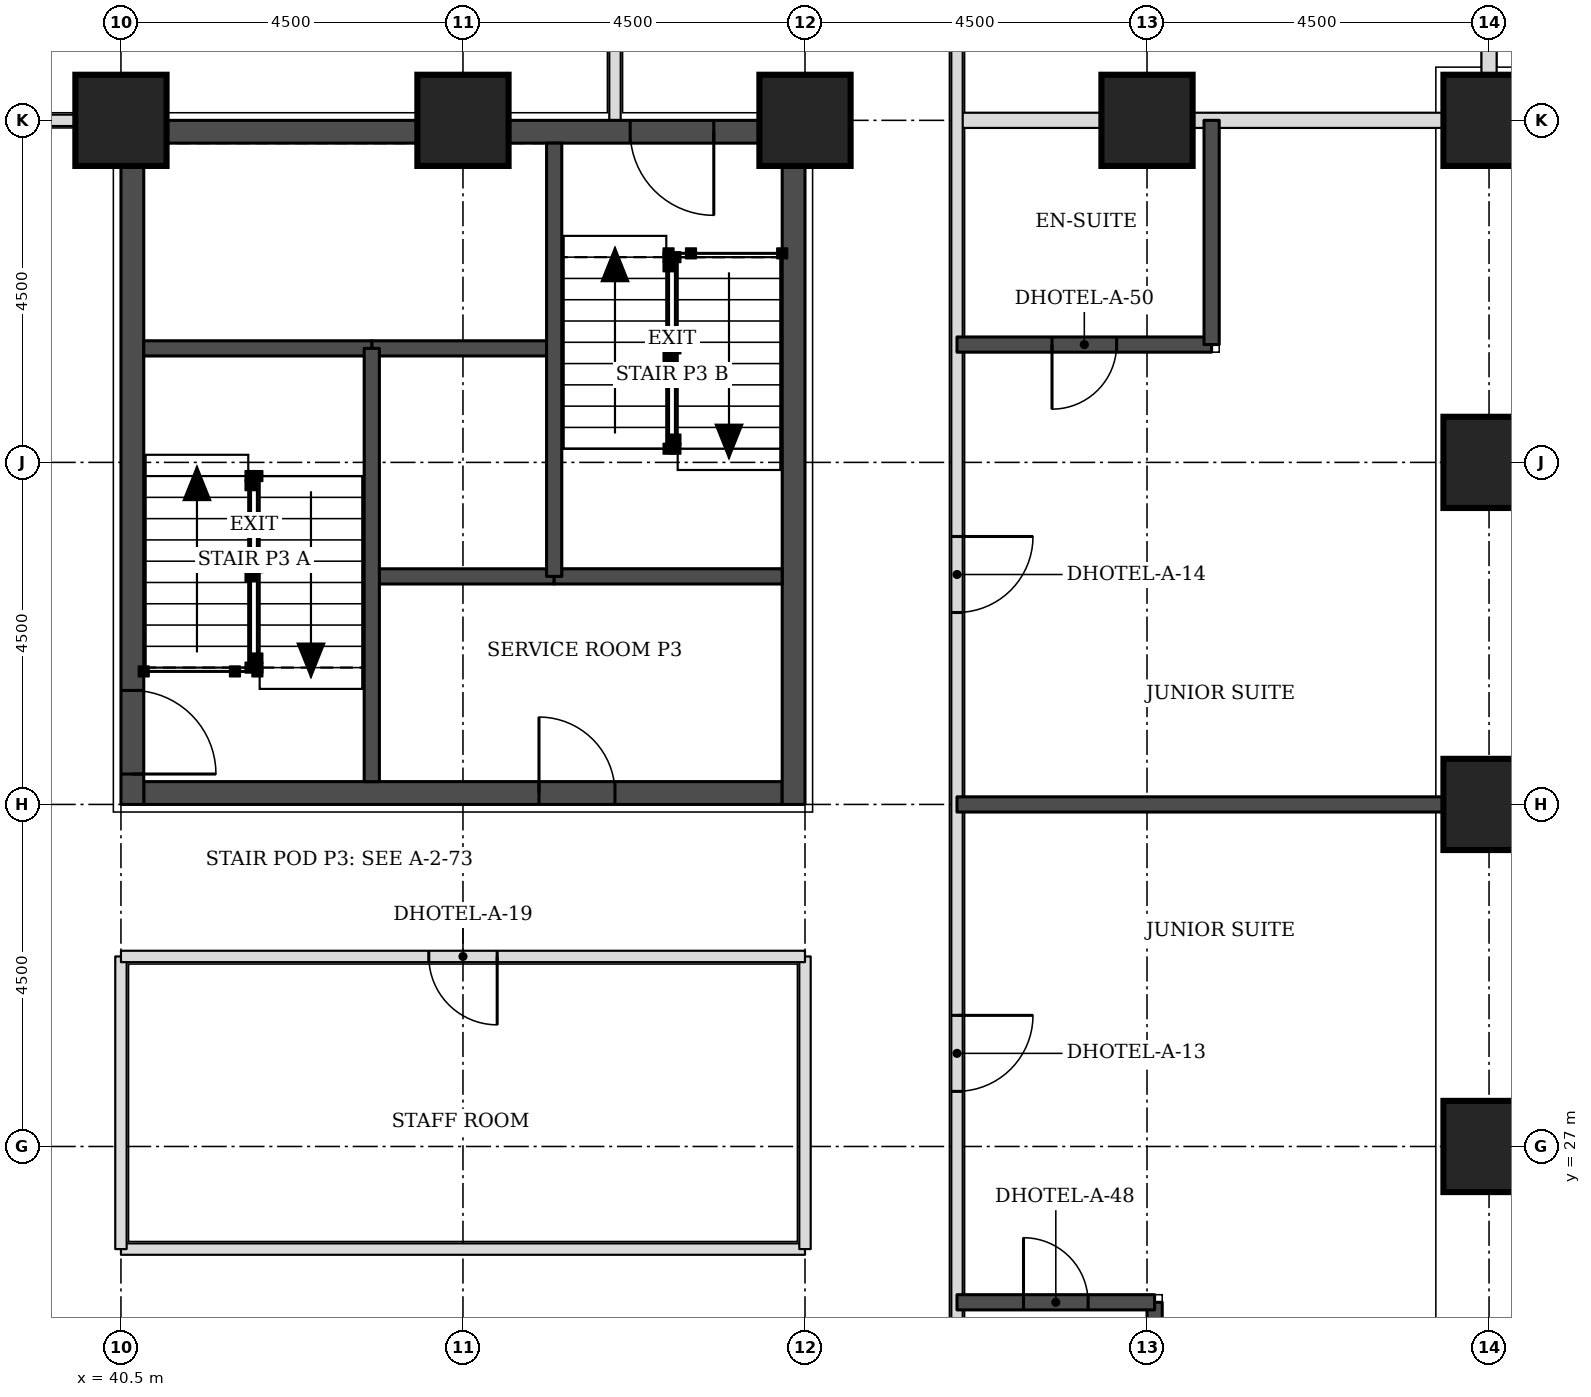
"""IFC4 building model, lengths in metres.
Left out: names, types, materials, properties, quantities, classifications, styles, units other than length and angle.
Written with IfcOpenShell. Run it as: python <this file> out.ifc"""

import sys

from ifc_helpers import new_model, si_unit, direction, frame, frame_2d, origin, origin_2d, place, context, subcontext, project, spatial, rectangle, extrude, element, fill, save


model = new_model("IFC4")
c1 = context("Model", 3, precision=1e-05, world=origin(), true_north=direction((0.0, 1.0)))
c2 = subcontext(c1, "Body", "Model", "MODEL_VIEW")
j1 = project(units=[si_unit("LENGTHUNIT", "METRE"), si_unit("PLANEANGLEUNIT", "RADIAN")], contexts=[c1])
p1 = place(None, origin())
s1 = spatial("IfcSite", under=j1, at=p1, CompositionType="ELEMENT")
p2 = place(p1, origin())
s2 = spatial("IfcBuilding", under=s1, at=p2, CompositionType="ELEMENT")
p3 = place(p2, frame((0.0, 0.0, 26.4)))
s3 = spatial("IfcBuildingStorey", under=s2, at=p3, CompositionType="ELEMENT", Elevation=26.4)
for number, where, z_axis, x_axis in (
    (1, (58.5, 27.0, 0.0), (0.0, 0.0, 1.0), (1.0, 0.0, 0.0)),
    (2, (58.5, 31.5, 0.0), (0.0, 0.0, 1.0), (1.0, 0.0, 0.0)),
    (3, (58.5, 36.0, 0.0), (0.0, 0.0, 1.0), (1.0, 0.0, 0.0)),
    (4, (40.5, 40.5, 0.0), (0.0, 0.0, 1.0), (1.0, 0.0, 0.0)),
    (5, (45.0, 40.5, 0.0), (0.0, 0.0, 1.0), (1.0, 0.0, 0.0)),
    (6, (49.5, 40.5, 0.0), (0.0, 0.0, 1.0), (1.0, 0.0, 0.0)),
    (7, (54.0, 40.5, 0.0), (0.0, 0.0, 1.0), (1.0, 0.0, 0.0)),
    (8, (58.5, 40.5, 0.0), (0.0, 0.0, 1.0), (1.0, 0.0, 0.0)),
):
    element("IfcColumn", number, at=place(p3, frame(where, z_axis=z_axis, x_axis=x_axis)), inside=s3, PredefinedType="COLUMN", context=c2, shape_type="SweptSolid", body=[
        extrude(rectangle(XDim=1.2, YDim=1.2, at=origin_2d()), origin(), (0.0, 0.0, 1.0), 3.3),
    ])
p4 = place(p3, frame((40.8, 31.65, 0.0), z_axis=(0.0, 0.0, 1.0), x_axis=(1.0, 0.0, 0.0)))
e9 = element("IfcWall", 9, at=p4, inside=s3, PredefinedType="SHEAR", context=c2, shape_type="SweptSolid", body=[
    extrude(rectangle(XDim=8.4, YDim=0.3, at=frame_2d((4.2, 0.0))), origin(), (0.0, 0.0, 1.0), 3.3),
])
p5 = place(p4, frame((5.2, 0.0, 0.0)))
e10 = element("IfcOpeningElement", 10, at=p5, cuts=e9, PredefinedType="OPENING", context=c2, shape_type="SweptSolid", body=[
    extrude(rectangle(XDim=1.0, YDim=2.1, at=frame_2d((0.5, 1.05))), frame((0.0, 0.16, 0.0), z_axis=(0.0, -1.0, 0.0), x_axis=(1.0, 0.0, 0.0)), (0.0, 0.0, 1.0), 0.32),
])
p6 = place(p3, frame((40.8, 40.35, 0.0), z_axis=(0.0, 0.0, 1.0), x_axis=(1.0, 0.0, 0.0)))
e11 = element("IfcWall", 11, at=p6, inside=s3, PredefinedType="SHEAR", context=c2, shape_type="SweptSolid", body=[
    extrude(rectangle(XDim=8.4, YDim=0.3, at=frame_2d((4.2, 0.0))), origin(), (0.0, 0.0, 1.0), 3.3),
])
p7 = place(p6, frame((6.4, 0.0, 0.0)))
e12 = element("IfcOpeningElement", 12, at=p7, cuts=e11, PredefinedType="OPENING", context=c2, shape_type="SweptSolid", body=[
    extrude(rectangle(XDim=1.1, YDim=2.1, at=frame_2d((0.55, 1.05))), frame((0.0, 0.16, 0.0), z_axis=(0.0, -1.0, 0.0), x_axis=(1.0, 0.0, 0.0)), (0.0, 0.0, 1.0), 0.32),
])
p8 = place(p3, frame((40.65, 31.5, 0.0), z_axis=(0.0, 0.0, 1.0), x_axis=(0.0, 1.0, 0.0)))
e13 = element("IfcWall", 13, at=p8, inside=s3, PredefinedType="SHEAR", context=c2, shape_type="SweptSolid", body=[
    extrude(rectangle(XDim=9.0, YDim=0.3, at=frame_2d((4.5, 0.0))), origin(), (0.0, 0.0, 1.0), 3.3),
])
p9 = place(p8, frame((0.4, 0.0, 0.0)))
e14 = element("IfcOpeningElement", 14, at=p9, cuts=e13, PredefinedType="OPENING", context=c2, shape_type="SweptSolid", body=[
    extrude(rectangle(XDim=1.1, YDim=2.1, at=frame_2d((0.55, 1.05))), frame((0.0, 0.16, 0.0), z_axis=(0.0, -1.0, 0.0), x_axis=(1.0, 0.0, 0.0)), (0.0, 0.0, 1.0), 0.32),
])
p10 = place(p3, frame((49.35, 31.5, 0.0), z_axis=(0.0, 0.0, 1.0), x_axis=(0.0, 1.0, 0.0)))
e15 = element("IfcWall", 15, at=p10, inside=s3, PredefinedType="SHEAR", context=c2, shape_type="SweptSolid", body=[
    extrude(rectangle(XDim=9.0, YDim=0.3, at=frame_2d((4.5, 0.0))), origin(), (0.0, 0.0, 1.0), 3.3),
])
p11 = place(p3, frame((51.5, 40.5, 0.0), z_axis=(0.0, 0.0, 1.0), x_axis=(1.0, 0.0, 0.0)))
e16 = element("IfcWall", 16, at=p11, inside=s3, PredefinedType="PARTITIONING", context=c2, shape_type="SweptSolid", body=[
    extrude(rectangle(XDim=6.4, YDim=0.2, at=frame_2d((3.2, 0.0))), origin(), (0.0, 0.0, 1.0), 2.33),
])
p12 = place(p3, frame((58.5, 41.1, 0.0), z_axis=(0.0, 0.0, 1.0), x_axis=(0.0, 1.0, 0.0)))
e17 = element("IfcWall", 17, at=p12, inside=s3, PredefinedType="PARTITIONING", context=c2, shape_type="SweptSolid", body=[
    extrude(rectangle(XDim=6.4, YDim=0.2, at=frame_2d((3.2, 0.0))), origin(), (0.0, 0.0, 1.0), 3.08),
])
p13 = place(p3, frame((51.5, 23.65, 0.0), z_axis=(0.0, 0.0, 1.0), x_axis=(0.0, 1.0, 0.0)))
e18 = element("IfcWall", 18, at=p13, inside=s3, PredefinedType="PARTITIONING", context=c2, shape_type="SweptSolid", body=[
    extrude(rectangle(XDim=23.85, YDim=0.15, at=frame_2d((11.925, 0.0))), origin(), (0.0, 0.0, 1.0), 3.08),
])
p14 = place(p13, frame((4.075, 0.0, 0.0)))
e19 = element("IfcOpeningElement", 19, at=p14, cuts=e18, PredefinedType="OPENING", context=c2, shape_type="SweptSolid", body=[
    extrude(rectangle(XDim=1.0, YDim=2.1, at=frame_2d((0.5, 1.05))), frame((0.0, 0.085, 0.0), z_axis=(0.0, -1.0, 0.0), x_axis=(1.0, 0.0, 0.0)), (0.0, 0.0, 1.0), 0.17),
])
p15 = place(p13, frame((10.375, 0.0, 0.0)))
e20 = element("IfcOpeningElement", 20, at=p15, cuts=e18, PredefinedType="OPENING", context=c2, shape_type="SweptSolid", body=[
    extrude(rectangle(XDim=1.0, YDim=2.1, at=frame_2d((0.5, 1.05))), frame((0.0, 0.085, 0.0), z_axis=(0.0, -1.0, 0.0), x_axis=(1.0, 0.0, 0.0)), (0.0, 0.0, 1.0), 0.17),
])
p16 = place(p13, frame((19.9, 0.0, 0.0)))
e21 = element("IfcOpeningElement", 21, at=p16, cuts=e18, PredefinedType="OPENING", context=c2, shape_type="SweptSolid", body=[
    extrude(rectangle(XDim=0.9, YDim=2.1, at=frame_2d((0.45, 1.05))), frame((0.0, 0.085, 0.0), z_axis=(0.0, -1.0, 0.0), x_axis=(1.0, 0.0, 0.0)), (0.0, 0.0, 1.0), 0.17),
])
p17 = place(p3, frame((40.5, 25.65, 0.0), z_axis=(0.0, 0.0, 1.0), x_axis=(1.0, 0.0, 0.0)))
e22 = element("IfcWall", 22, at=p17, inside=s3, PredefinedType="PARTITIONING", context=c2, shape_type="SweptSolid", body=[
    extrude(rectangle(XDim=9.0, YDim=0.15, at=frame_2d((4.5, 0.0))), origin(), (0.0, 0.0, 1.0), 3.08),
])
for number, where, z_axis, x_axis in (
    (23, (40.5, 25.65, 0.0), (0.0, 0.0, 1.0), (0.0, 1.0, 0.0)),
    (24, (49.5, 25.65, 0.0), (0.0, 0.0, 1.0), (0.0, 1.0, 0.0)),
):
    element("IfcWall", number, at=place(p3, frame(where, z_axis=z_axis, x_axis=x_axis)), inside=s3, PredefinedType="PARTITIONING", context=c2, shape_type="SweptSolid", body=[
        extrude(rectangle(XDim=3.85, YDim=0.15, at=frame_2d((1.925, 0.0))), origin(), (0.0, 0.0, 1.0), 3.08),
    ])
p18 = place(p3, frame((40.5, 29.5, 0.0), z_axis=(0.0, 0.0, 1.0), x_axis=(1.0, 0.0, 0.0)))
e25 = element("IfcWall", 25, at=p18, inside=s3, PredefinedType="PARTITIONING", context=c2, shape_type="SweptSolid", body=[
    extrude(rectangle(XDim=9.0, YDim=0.15, at=frame_2d((4.5, 0.0))), origin(), (0.0, 0.0, 1.0), 3.08),
])
p19 = place(p18, frame((4.05, 0.0, 0.0)))
e26 = element("IfcOpeningElement", 26, at=p19, cuts=e25, PredefinedType="OPENING", context=c2, shape_type="SweptSolid", body=[
    extrude(rectangle(XDim=0.9, YDim=2.1, at=frame_2d((0.45, 1.05))), frame((0.0, 0.085, 0.0), z_axis=(0.0, -1.0, 0.0), x_axis=(1.0, 0.0, 0.0)), (0.0, 0.0, 1.0), 0.17),
])
p20 = place(p3, frame((38.5, 40.5, 0.0), z_axis=(0.0, 0.0, 1.0), x_axis=(1.0, 0.0, 0.0)))
e27 = element("IfcWall", 27, at=p20, inside=s3, PredefinedType="PARTITIONING", context=c2, shape_type="SweptSolid", body=[
    extrude(rectangle(XDim=1.95, YDim=0.15, at=frame_2d((0.975, 0.0))), origin(), (0.0, 0.0, 1.0), 2.33),
])
p21 = place(p3, frame((47.0, 40.5, 0.0), z_axis=(0.0, 0.0, 1.0), x_axis=(0.0, 1.0, 0.0)))
e28 = element("IfcWall", 28, at=p21, inside=s3, PredefinedType="PARTITIONING", context=c2, shape_type="SweptSolid", body=[
    extrude(rectangle(XDim=7.0, YDim=0.15, at=frame_2d((3.5, 0.0))), origin(), (0.0, 0.0, 1.0), 3.08),
])
p22 = place(p21, frame((3.05, 0.0, 0.0)))
e29 = element("IfcOpeningElement", 29, at=p22, cuts=e28, PredefinedType="OPENING", context=c2, shape_type="SweptSolid", body=[
    extrude(rectangle(XDim=0.9, YDim=2.1, at=frame_2d((0.45, 1.05))), frame((0.0, 0.085, 0.0), z_axis=(0.0, -1.0, 0.0), x_axis=(1.0, 0.0, 0.0)), (0.0, 0.0, 1.0), 0.17),
])
p23 = place(p3, frame((54.1, 22.5, 0.0), z_axis=(0.0, 0.0, 1.0), x_axis=(0.0, 1.0, 0.0)))
e30 = element("IfcWall", 30, at=p23, inside=s3, PredefinedType="SOLIDWALL", context=c2, shape_type="SweptSolid", body=[
    extrude(rectangle(XDim=2.45, YDim=0.2, at=frame_2d((1.225, 0.0))), origin(), (0.0, 0.0, 1.0), 3.08),
])
p24 = place(p3, frame((51.5, 24.95, 0.0), z_axis=(0.0, 0.0, 1.0), x_axis=(1.0, 0.0, 0.0)))
e31 = element("IfcWall", 31, at=p24, inside=s3, PredefinedType="SOLIDWALL", context=c2, shape_type="SweptSolid", body=[
    extrude(rectangle(XDim=2.6, YDim=0.2, at=frame_2d((1.3, 0.0))), origin(), (0.0, 0.0, 1.0), 3.08),
])
p25 = place(p24, frame((0.875, 0.0, 0.0)))
e32 = element("IfcOpeningElement", 32, at=p25, cuts=e31, PredefinedType="OPENING", context=c2, shape_type="SweptSolid", body=[
    extrude(rectangle(XDim=0.85, YDim=2.1, at=frame_2d((0.425, 1.05))), frame((0.0, 0.11, 0.0), z_axis=(0.0, -1.0, 0.0), x_axis=(1.0, 0.0, 0.0)), (0.0, 0.0, 1.0), 0.22),
])
p26 = place(p3, frame((51.5, 31.5, 0.0), z_axis=(0.0, 0.0, 1.0), x_axis=(1.0, 0.0, 0.0)))
e33 = element("IfcWall", 33, at=p26, inside=s3, PredefinedType="SOLIDWALL", context=c2, shape_type="SweptSolid", body=[
    extrude(rectangle(XDim=6.4, YDim=0.2, at=frame_2d((3.2, 0.0))), origin(), (0.0, 0.0, 1.0), 3.08),
])
p27 = place(p3, frame((51.5, 37.55, 0.0), z_axis=(0.0, 0.0, 1.0), x_axis=(1.0, 0.0, 0.0)))
e34 = element("IfcWall", 34, at=p27, inside=s3, PredefinedType="SOLIDWALL", context=c2, shape_type="SweptSolid", body=[
    extrude(rectangle(XDim=3.35, YDim=0.2, at=frame_2d((1.675, 0.0))), origin(), (0.0, 0.0, 1.0), 3.08),
])
p28 = place(p27, frame((1.25, 0.0, 0.0)))
e35 = element("IfcOpeningElement", 35, at=p28, cuts=e34, PredefinedType="OPENING", context=c2, shape_type="SweptSolid", body=[
    extrude(rectangle(XDim=0.85, YDim=2.1, at=frame_2d((0.425, 1.05))), frame((0.0, 0.11, 0.0), z_axis=(0.0, -1.0, 0.0), x_axis=(1.0, 0.0, 0.0)), (0.0, 0.0, 1.0), 0.22),
])
p29 = place(p3, frame((54.85, 37.55, 0.0), z_axis=(0.0, 0.0, 1.0), x_axis=(0.0, 1.0, 0.0)))
e36 = element("IfcWall", 36, at=p29, inside=s3, PredefinedType="SOLIDWALL", context=c2, shape_type="SweptSolid", body=[
    extrude(rectangle(XDim=2.95, YDim=0.2, at=frame_2d((1.475, 0.0))), origin(), (0.0, 0.0, 1.0), 3.08),
])
p30 = place(p3, frame((43.8, 34.5, 0.0), z_axis=(0.0, 0.0, 1.0), x_axis=(1.0, 0.0, 0.0)))
e37 = element("IfcWall", 37, at=p30, inside=s3, PredefinedType="SOLIDWALL", context=c2, shape_type="SweptSolid", body=[
    extrude(rectangle(XDim=2.4, YDim=0.2, at=frame_2d((1.2, 0.0))), origin(), (0.0, 0.0, 1.0), 3.08),
])
p31 = place(p3, frame((46.2, 34.5, 0.0), z_axis=(0.0, 0.0, 1.0), x_axis=(1.0, 0.0, 0.0)))
e38 = element("IfcWall", 38, at=p31, inside=s3, PredefinedType="SOLIDWALL", context=c2, shape_type="SweptSolid", body=[
    extrude(rectangle(XDim=3.0, YDim=0.2, at=frame_2d((1.5, 0.0))), origin(), (0.0, 0.0, 1.0), 3.08),
])
p32 = place(p3, frame((43.8, 37.5, 0.0), z_axis=(0.0, 0.0, 1.0), x_axis=(1.0, 0.0, 0.0)))
e39 = element("IfcWall", 39, at=p32, inside=s3, PredefinedType="SOLIDWALL", context=c2, shape_type="SweptSolid", body=[
    extrude(rectangle(XDim=2.4, YDim=0.2, at=frame_2d((1.2, 0.0))), origin(), (0.0, 0.0, 1.0), 3.3),
])
p33 = place(p3, frame((40.8, 37.5, 0.0), z_axis=(0.0, 0.0, 1.0), x_axis=(1.0, 0.0, 0.0)))
e40 = element("IfcWall", 40, at=p33, inside=s3, PredefinedType="SOLIDWALL", context=c2, shape_type="SweptSolid", body=[
    extrude(rectangle(XDim=3.0, YDim=0.2, at=frame_2d((1.5, 0.0))), origin(), (0.0, 0.0, 1.0), 3.08),
])
for number, where, z_axis, x_axis in (
    (41, (43.8, 31.8, 0.0), (0.0, 0.0, 1.0), (0.0, 1.0, 0.0)),
    (42, (46.2, 34.5, 0.0), (0.0, 0.0, 1.0), (0.0, 1.0, 0.0)),
):
    element("IfcWall", number, at=place(p3, frame(where, z_axis=z_axis, x_axis=x_axis)), inside=s3, PredefinedType="SOLIDWALL", context=c2, shape_type="SweptSolid", body=[
        extrude(rectangle(XDim=5.7, YDim=0.2, at=frame_2d((2.85, 0.0))), origin(), (0.0, 0.0, 1.0), 3.08),
    ])
p34 = place(p14, frame((1.0, 0.0, 0.0), z_axis=(0.0, 0.0, 1.0), x_axis=(-1.0, 0.0, 0.0)))
e43 = element("IfcDoor", 43, at=p34, inside=s3, OperationType="SINGLE_SWING_LEFT", PredefinedType="DOOR", context=c2, shape_type="SweptSolid", body=[
    extrude(rectangle(XDim=1.0, YDim=2.1, at=frame_2d((0.5, 1.05))), frame((0.0, 0.025, 0.0), z_axis=(0.0, -1.0, 0.0), x_axis=(1.0, 0.0, 0.0)), (0.0, 0.0, 1.0), 0.05),
])
fill(e19, e43)
p35 = place(p25, origin())
e44 = element("IfcDoor", 44, at=p35, inside=s3, OperationType="SINGLE_SWING_LEFT", PredefinedType="DOOR", context=c2, shape_type="SweptSolid", body=[
    extrude(rectangle(XDim=0.85, YDim=2.1, at=frame_2d((0.425, 1.05))), frame((0.0, 0.025, 0.0), z_axis=(0.0, -1.0, 0.0), x_axis=(1.0, 0.0, 0.0)), (0.0, 0.0, 1.0), 0.05),
])
fill(e32, e44)
p36 = place(p15, frame((1.0, 0.0, 0.0), z_axis=(0.0, 0.0, 1.0), x_axis=(-1.0, 0.0, 0.0)))
e45 = element("IfcDoor", 45, at=p36, inside=s3, OperationType="SINGLE_SWING_LEFT", PredefinedType="DOOR", context=c2, shape_type="SweptSolid", body=[
    extrude(rectangle(XDim=1.0, YDim=2.1, at=frame_2d((0.5, 1.05))), frame((0.0, 0.025, 0.0), z_axis=(0.0, -1.0, 0.0), x_axis=(1.0, 0.0, 0.0)), (0.0, 0.0, 1.0), 0.05),
])
fill(e20, e45)
p37 = place(p28, frame((0.85, 0.0, 0.0), z_axis=(0.0, 0.0, 1.0), x_axis=(-1.0, 0.0, 0.0)))
e46 = element("IfcDoor", 46, at=p37, inside=s3, OperationType="SINGLE_SWING_RIGHT", PredefinedType="DOOR", context=c2, shape_type="SweptSolid", body=[
    extrude(rectangle(XDim=0.85, YDim=2.1, at=frame_2d((0.425, 1.05))), frame((0.0, 0.025, 0.0), z_axis=(0.0, -1.0, 0.0), x_axis=(1.0, 0.0, 0.0)), (0.0, 0.0, 1.0), 0.05),
])
fill(e35, e46)
p38 = place(p19, frame((0.9, 0.0, 0.0), z_axis=(0.0, 0.0, 1.0), x_axis=(-1.0, 0.0, 0.0)))
e47 = element("IfcDoor", 47, at=p38, inside=s3, OperationType="SINGLE_SWING_LEFT", PredefinedType="DOOR", context=c2, shape_type="SweptSolid", body=[
    extrude(rectangle(XDim=0.9, YDim=2.1, at=frame_2d((0.45, 1.05))), frame((0.0, 0.025, 0.0), z_axis=(0.0, -1.0, 0.0), x_axis=(1.0, 0.0, 0.0)), (0.0, 0.0, 1.0), 0.05),
])
fill(e26, e47)
p39 = place(p9, frame((1.1, 0.0, 0.0), z_axis=(0.0, 0.0, 1.0), x_axis=(-1.0, 0.0, 0.0)))
e48 = element("IfcDoor", 48, at=p39, inside=s3, OperationType="SINGLE_SWING_RIGHT", PredefinedType="DOOR", context=c2, shape_type="SweptSolid", body=[
    extrude(rectangle(XDim=1.1, YDim=2.1, at=frame_2d((0.55, 1.05))), frame((0.0, 0.025, 0.0), z_axis=(0.0, -1.0, 0.0), x_axis=(1.0, 0.0, 0.0)), (0.0, 0.0, 1.0), 0.05),
])
fill(e14, e48)
p40 = place(p7, frame((1.1, 0.0, 0.0), z_axis=(0.0, 0.0, 1.0), x_axis=(-1.0, 0.0, 0.0)))
e49 = element("IfcDoor", 49, at=p40, inside=s3, OperationType="SINGLE_SWING_LEFT", PredefinedType="DOOR", context=c2, shape_type="SweptSolid", body=[
    extrude(rectangle(XDim=1.1, YDim=2.1, at=frame_2d((0.55, 1.05))), frame((0.0, 0.025, 0.0), z_axis=(0.0, -1.0, 0.0), x_axis=(1.0, 0.0, 0.0)), (0.0, 0.0, 1.0), 0.05),
])
fill(e12, e49)
p41 = place(p5, origin())
e50 = element("IfcDoor", 50, at=p41, inside=s3, OperationType="SINGLE_SWING_LEFT", PredefinedType="DOOR", context=c2, shape_type="SweptSolid", body=[
    extrude(rectangle(XDim=1.0, YDim=2.1, at=frame_2d((0.5, 1.05))), frame((0.0, 0.025, 0.0), z_axis=(0.0, -1.0, 0.0), x_axis=(1.0, 0.0, 0.0)), (0.0, 0.0, 1.0), 0.05),
])
fill(e10, e50)
save(model, sys.argv[1])
